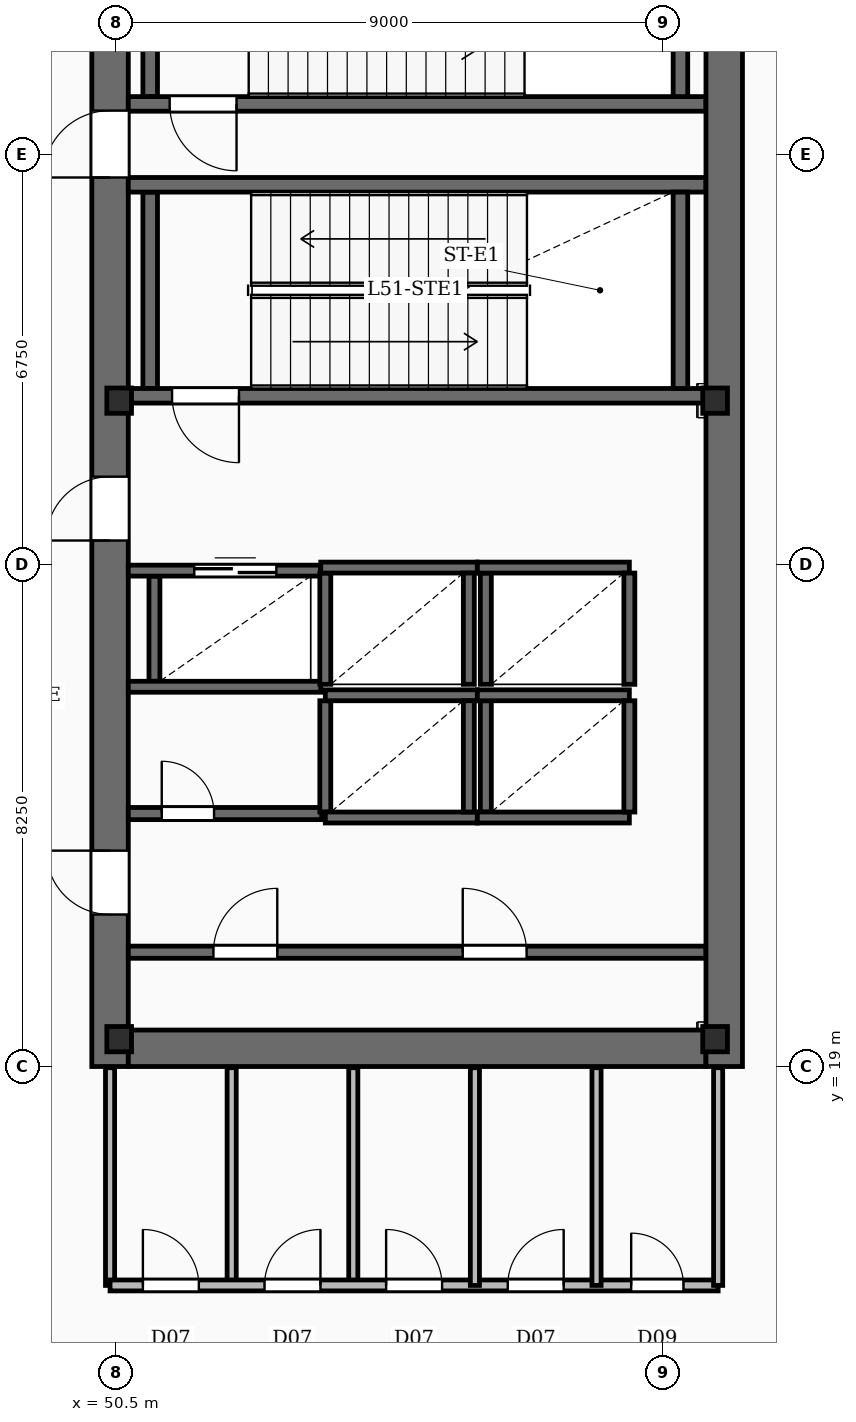
"""IFC4 building model, lengths in metres.
Left out: names, types, materials, properties, quantities, classifications, styles, units other than length and angle.
Written with IfcOpenShell. Run it as: python <this file> out.ifc"""

import sys

from ifc_helpers import new_model, si_unit, direction, frame, frame_2d, origin, origin_2d, place, context, subcontext, project, spatial, rectangle, i_section, extrude, element, fill, save


model = new_model("IFC4")
c1 = context("Model", 3, precision=1e-05, world=origin(), true_north=direction((0.0, 1.0)))
c2 = subcontext(c1, "Body", "Model", "MODEL_VIEW")
j1 = project(units=[si_unit("LENGTHUNIT", "METRE"), si_unit("PLANEANGLEUNIT", "RADIAN")], contexts=[c1])
p1 = place(None, origin())
s1 = spatial("IfcSite", under=j1, at=p1, CompositionType="ELEMENT")
p2 = place(p1, origin())
s2 = spatial("IfcBuilding", under=s1, at=p2, CompositionType="ELEMENT")
p3 = place(p2, frame((0.0, 0.0, 210.95)))
s3 = spatial("IfcBuildingStorey", under=s2, at=p3, CompositionType="ELEMENT", Elevation=210.95)
p4 = place(p3, frame((50.4, 19.0, -0.42), z_axis=(0.0, 0.0, 1.0), x_axis=(0.0, 1.0, 0.0)))
e1 = element("IfcWall", 1, at=p4, inside=s3, PredefinedType="SHEAR", context=c2, shape_type="SweptSolid", body=[
    extrude(rectangle(XDim=20.8, YDim=0.6, at=frame_2d((10.4, 0.0))), origin(), (0.0, 0.0, 1.0), 5.17),
])
p5 = place(p4, frame((2.5, 0.0, 0.42)))
e2 = element("IfcOpeningElement", 2, at=p5, cuts=e1, PredefinedType="OPENING", context=c2, shape_type="SweptSolid", body=[
    extrude(rectangle(XDim=1.05, YDim=2.15, at=frame_2d((0.525, 1.075))), frame((0.0, 0.31, 0.0), z_axis=(0.0, -1.0, 0.0), x_axis=(1.0, 0.0, 0.0)), (0.0, 0.0, 1.0), 0.62),
])
p6 = place(p4, frame((8.65, 0.0, 0.42)))
e3 = element("IfcOpeningElement", 3, at=p6, cuts=e1, PredefinedType="OPENING", context=c2, shape_type="SweptSolid", body=[
    extrude(rectangle(XDim=1.05, YDim=2.15, at=frame_2d((0.525, 1.075))), frame((0.0, 0.31, 0.0), z_axis=(0.0, -1.0, 0.0), x_axis=(1.0, 0.0, 0.0)), (0.0, 0.0, 1.0), 0.62),
])
p7 = place(p4, frame((14.62, 0.0, 0.42)))
e4 = element("IfcOpeningElement", 4, at=p7, cuts=e1, PredefinedType="OPENING", context=c2, shape_type="SweptSolid", body=[
    extrude(rectangle(XDim=1.1, YDim=2.15, at=frame_2d((0.55, 1.075))), frame((0.0, 0.31, 0.0), z_axis=(0.0, -1.0, 0.0), x_axis=(1.0, 0.0, 0.0)), (0.0, 0.0, 1.0), 0.62),
])
p8 = place(p3, frame((60.5, 19.0, -0.42), z_axis=(0.0, 0.0, 1.0), x_axis=(0.0, 1.0, 0.0)))
e5 = element("IfcWall", 5, at=p8, inside=s3, PredefinedType="SHEAR", context=c2, shape_type="SweptSolid", body=[
    extrude(rectangle(XDim=20.8, YDim=0.6, at=frame_2d((10.4, 0.0))), origin(), (0.0, 0.0, 1.0), 5.17),
])
p9 = place(p3, frame((50.7, 19.3, -0.42), z_axis=(0.0, 0.0, 1.0), x_axis=(1.0, 0.0, 0.0)))
e6 = element("IfcWall", 6, at=p9, inside=s3, PredefinedType="SHEAR", context=c2, shape_type="SweptSolid", body=[
    extrude(rectangle(XDim=9.5, YDim=0.6, at=frame_2d((4.75, 0.0))), origin(), (0.0, 0.0, 1.0), 5.17),
])
for number, where, z_axis, x_axis in (
    (7, (50.55, 19.45, -0.42), (0.0, 0.0, 1.0), (1.0, 0.0, 0.0)),
    (8, (60.35, 19.45, -0.42), (0.0, 0.0, 1.0), (1.0, 0.0, 0.0)),
    (9, (50.55, 29.95, -0.42), (0.0, 0.0, 1.0), (1.0, 0.0, 0.0)),
    (10, (60.35, 29.95, -0.42), (0.0, 0.0, 1.0), (1.0, 0.0, 0.0)),
):
    element("IfcColumn", number, at=place(p3, frame(where, z_axis=z_axis, x_axis=x_axis)), inside=s3, PredefinedType="COLUMN", context=c2, shape_type="SweptSolid", body=[
        extrude(i_section(OverallWidth=0.406, OverallDepth=0.416, WebThickness=0.03, FlangeThickness=0.048, FilletRadius=0.02, at=origin_2d()), origin(), (0.0, 0.0, 1.0), 5.17),
    ])
p10 = place(p3, frame((60.2, 30.03, 0.0), z_axis=(0.0, 0.0, 1.0), x_axis=(-1.0, 0.0, 0.0)))
e11 = element("IfcWall", 11, at=p10, inside=s3, PredefinedType="SOLIDWALL", context=c2, shape_type="SweptSolid", body=[
    extrude(rectangle(XDim=9.5, YDim=0.24, at=frame_2d((4.75, 0.0))), origin(), (0.0, 0.0, 1.0), 4.75),
])
p11 = place(p10, frame((7.68, 0.0, 0.0)))
e12 = element("IfcOpeningElement", 12, at=p11, cuts=e11, PredefinedType="OPENING", context=c2, shape_type="SweptSolid", body=[
    extrude(rectangle(XDim=1.1, YDim=2.15, at=frame_2d((0.55, 1.075))), frame((0.0, 0.13, 0.0), z_axis=(0.0, -1.0, 0.0), x_axis=(1.0, 0.0, 0.0)), (0.0, 0.0, 1.0), 0.26),
])
p12 = place(p3, frame((50.7, 33.5, 0.0), z_axis=(0.0, 0.0, 1.0), x_axis=(1.0, 0.0, 0.0)))
e13 = element("IfcWall", 13, at=p12, inside=s3, PredefinedType="SOLIDWALL", context=c2, shape_type="SweptSolid", body=[
    extrude(rectangle(XDim=9.5, YDim=0.24, at=frame_2d((4.75, 0.0))), origin(), (0.0, 0.0, 1.0), 4.75),
])
for number, where, z_axis, x_axis in (
    (14, (51.06, 30.15, 0.0), (0.0, 0.0, 1.0), (0.0, 1.0, 0.0)),
    (15, (59.78, 30.15, 0.0), (0.0, 0.0, 1.0), (0.0, 1.0, 0.0)),
):
    element("IfcWall", number, at=place(p3, frame(where, z_axis=z_axis, x_axis=x_axis)), inside=s3, PredefinedType="SOLIDWALL", context=c2, shape_type="SweptSolid", body=[
        extrude(rectangle(XDim=3.23, YDim=0.24, at=frame_2d((1.615, 0.0))), origin(), (0.0, 0.0, 1.0), 4.75),
    ])
p13 = place(p3, frame((60.2, 34.83, 0.0), z_axis=(0.0, 0.0, 1.0), x_axis=(-1.0, 0.0, 0.0)))
e16 = element("IfcWall", 16, at=p13, inside=s3, PredefinedType="SOLIDWALL", context=c2, shape_type="SweptSolid", body=[
    extrude(rectangle(XDim=9.5, YDim=0.24, at=frame_2d((4.75, 0.0))), origin(), (0.0, 0.0, 1.0), 4.75),
])
p14 = place(p13, frame((7.72, 0.0, 0.0)))
e17 = element("IfcOpeningElement", 17, at=p14, cuts=e16, PredefinedType="OPENING", context=c2, shape_type="SweptSolid", body=[
    extrude(rectangle(XDim=1.1, YDim=2.15, at=frame_2d((0.55, 1.075))), frame((0.0, 0.13, 0.0), z_axis=(0.0, -1.0, 0.0), x_axis=(1.0, 0.0, 0.0)), (0.0, 0.0, 1.0), 0.26),
])
for number, where, z_axis, x_axis in (
    (18, (51.06, 34.95, 0.0), (0.0, 0.0, 1.0), (0.0, 1.0, 0.0)),
    (19, (59.78, 34.95, 0.0), (0.0, 0.0, 1.0), (0.0, 1.0, 0.0)),
):
    element("IfcWall", number, at=place(p3, frame(where, z_axis=z_axis, x_axis=x_axis)), inside=s3, PredefinedType="SOLIDWALL", context=c2, shape_type="SweptSolid", body=[
        extrude(rectangle(XDim=3.15, YDim=0.24, at=frame_2d((1.575, 0.0))), origin(), (0.0, 0.0, 1.0), 4.75),
    ])
for number, where, z_axis, x_axis in (
    (20, (53.94, 25.105, 0.0), (0.0, 0.0, 1.0), (1.0, 0.0, 0.0)),
    (21, (53.94, 23.095, 0.0), (0.0, 0.0, 1.0), (1.0, 0.0, 0.0)),
):
    element("IfcWall", number, at=place(p3, frame(where, z_axis=z_axis, x_axis=x_axis)), inside=s3, PredefinedType="SOLIDWALL", context=c2, shape_type="SweptSolid", body=[
        extrude(rectangle(XDim=2.5, YDim=0.18, at=frame_2d((1.25, 0.0))), origin(), (0.0, 0.0, 1.0), 4.75),
    ])
for number, where, z_axis, x_axis in (
    (22, (53.94, 23.185, 0.0), (0.0, 0.0, 1.0), (0.0, 1.0, 0.0)),
    (23, (56.3, 23.185, 0.0), (0.0, 0.0, 1.0), (0.0, 1.0, 0.0)),
):
    element("IfcWall", number, at=place(p3, frame(where, z_axis=z_axis, x_axis=x_axis)), inside=s3, PredefinedType="SOLIDWALL", context=c2, shape_type="SweptSolid", body=[
        extrude(rectangle(XDim=1.83, YDim=0.18, at=frame_2d((0.915, 0.0))), origin(), (0.0, 0.0, 1.0), 4.75),
    ])
for number, where, z_axis, x_axis in (
    (24, (56.44, 25.105, 0.0), (0.0, 0.0, 1.0), (1.0, 0.0, 0.0)),
    (25, (56.44, 23.095, 0.0), (0.0, 0.0, 1.0), (1.0, 0.0, 0.0)),
):
    element("IfcWall", number, at=place(p3, frame(where, z_axis=z_axis, x_axis=x_axis)), inside=s3, PredefinedType="SOLIDWALL", context=c2, shape_type="SweptSolid", body=[
        extrude(rectangle(XDim=2.5, YDim=0.18, at=frame_2d((1.25, 0.0))), origin(), (0.0, 0.0, 1.0), 4.75),
    ])
for number, where, z_axis, x_axis in (
    (26, (56.58, 23.185, 0.0), (0.0, 0.0, 1.0), (0.0, 1.0, 0.0)),
    (27, (58.94, 23.185, 0.0), (0.0, 0.0, 1.0), (0.0, 1.0, 0.0)),
):
    element("IfcWall", number, at=place(p3, frame(where, z_axis=z_axis, x_axis=x_axis)), inside=s3, PredefinedType="SOLIDWALL", context=c2, shape_type="SweptSolid", body=[
        extrude(rectangle(XDim=1.83, YDim=0.18, at=frame_2d((0.915, 0.0))), origin(), (0.0, 0.0, 1.0), 4.75),
    ])
p15 = place(p3, frame((53.865, 27.205, 0.0), z_axis=(0.0, 0.0, 1.0), x_axis=(1.0, 0.0, 0.0)))
e28 = element("IfcWall", 28, at=p15, inside=s3, PredefinedType="SOLIDWALL", context=c2, shape_type="SweptSolid", body=[
    extrude(rectangle(XDim=2.575, YDim=0.18, at=frame_2d((1.288, 0.0))), origin(), (0.0, 0.0, 1.0), 4.75),
])
for number, where, z_axis, x_axis in (
    (29, (53.94, 25.285, 0.0), (0.0, 0.0, 1.0), (0.0, 1.0, 0.0)),
    (30, (56.3, 25.285, 0.0), (0.0, 0.0, 1.0), (0.0, 1.0, 0.0)),
):
    element("IfcWall", number, at=place(p3, frame(where, z_axis=z_axis, x_axis=x_axis)), inside=s3, PredefinedType="SOLIDWALL", context=c2, shape_type="SweptSolid", body=[
        extrude(rectangle(XDim=1.83, YDim=0.18, at=frame_2d((0.915, 0.0))), origin(), (0.0, 0.0, 1.0), 4.75),
    ])
p16 = place(p3, frame((56.44, 27.205, 0.0), z_axis=(0.0, 0.0, 1.0), x_axis=(1.0, 0.0, 0.0)))
e31 = element("IfcWall", 31, at=p16, inside=s3, PredefinedType="SOLIDWALL", context=c2, shape_type="SweptSolid", body=[
    extrude(rectangle(XDim=2.5, YDim=0.18, at=frame_2d((1.25, 0.0))), origin(), (0.0, 0.0, 1.0), 4.75),
])
for number, where, z_axis, x_axis in (
    (32, (56.58, 25.285, 0.0), (0.0, 0.0, 1.0), (0.0, 1.0, 0.0)),
    (33, (58.94, 25.285, 0.0), (0.0, 0.0, 1.0), (0.0, 1.0, 0.0)),
):
    element("IfcWall", number, at=place(p3, frame(where, z_axis=z_axis, x_axis=x_axis)), inside=s3, PredefinedType="SOLIDWALL", context=c2, shape_type="SweptSolid", body=[
        extrude(rectangle(XDim=1.83, YDim=0.18, at=frame_2d((0.915, 0.0))), origin(), (0.0, 0.0, 1.0), 4.75),
    ])
p17 = place(p3, frame((50.7, 27.155, 0.0), z_axis=(0.0, 0.0, 1.0), x_axis=(1.0, 0.0, 0.0)))
e34 = element("IfcWall", 34, at=p17, inside=s3, PredefinedType="SOLIDWALL", context=c2, shape_type="SweptSolid", body=[
    extrude(rectangle(XDim=3.165, YDim=0.18, at=frame_2d((1.583, 0.0))), origin(), (0.0, 0.0, 1.0), 4.75),
])
p18 = place(p17, frame((1.085, 0.0, 0.0)))
e35 = element("IfcOpeningElement", 35, at=p18, cuts=e34, PredefinedType="OPENING", context=c2, shape_type="SweptSolid", body=[
    extrude(rectangle(XDim=1.35, YDim=2.3, at=frame_2d((0.675, 1.15))), frame((0.0, 0.1, 0.0), z_axis=(0.0, -1.0, 0.0), x_axis=(1.0, 0.0, 0.0)), (0.0, 0.0, 1.0), 0.2),
])
p19 = place(p3, frame((50.7, 25.245, 0.0), z_axis=(0.0, 0.0, 1.0), x_axis=(1.0, 0.0, 0.0)))
e36 = element("IfcWall", 36, at=p19, inside=s3, PredefinedType="SOLIDWALL", context=c2, shape_type="SweptSolid", body=[
    extrude(rectangle(XDim=3.165, YDim=0.18, at=frame_2d((1.583, 0.0))), origin(), (0.0, 0.0, 1.0), 4.75),
])
p20 = place(p3, frame((51.13, 25.335, 0.0), z_axis=(0.0, 0.0, 1.0), x_axis=(0.0, 1.0, 0.0)))
e37 = element("IfcWall", 37, at=p20, inside=s3, PredefinedType="SOLIDWALL", context=c2, shape_type="SweptSolid", body=[
    extrude(rectangle(XDim=1.73, YDim=0.18, at=frame_2d((0.865, 0.0))), origin(), (0.0, 0.0, 1.0), 4.75),
])
p21 = place(p3, frame((50.7, 20.88, 0.0), z_axis=(0.0, 0.0, 1.0), x_axis=(1.0, 0.0, 0.0)))
e38 = element("IfcWall", 38, at=p21, inside=s3, PredefinedType="SOLIDWALL", context=c2, shape_type="SweptSolid", body=[
    extrude(rectangle(XDim=9.5, YDim=0.2, at=frame_2d((4.75, 0.0))), origin(), (0.0, 0.0, 1.0), 3.81),
])
p22 = place(p21, frame((1.4, 0.0, 0.0)))
e39 = element("IfcOpeningElement", 39, at=p22, cuts=e38, PredefinedType="OPENING", context=c2, shape_type="SweptSolid", body=[
    extrude(rectangle(XDim=1.05, YDim=2.15, at=frame_2d((0.525, 1.075))), frame((0.0, 0.11, 0.0), z_axis=(0.0, -1.0, 0.0), x_axis=(1.0, 0.0, 0.0)), (0.0, 0.0, 1.0), 0.22),
])
p23 = place(p21, frame((5.5, 0.0, 0.0)))
e40 = element("IfcOpeningElement", 40, at=p23, cuts=e38, PredefinedType="OPENING", context=c2, shape_type="SweptSolid", body=[
    extrude(rectangle(XDim=1.05, YDim=2.15, at=frame_2d((0.525, 1.075))), frame((0.0, 0.11, 0.0), z_axis=(0.0, -1.0, 0.0), x_axis=(1.0, 0.0, 0.0)), (0.0, 0.0, 1.0), 0.22),
])
p24 = place(p3, frame((50.7, 23.16, 0.0), z_axis=(0.0, 0.0, 1.0), x_axis=(1.0, 0.0, 0.0)))
e41 = element("IfcWall", 41, at=p24, inside=s3, PredefinedType="SOLIDWALL", context=c2, shape_type="SweptSolid", body=[
    extrude(rectangle(XDim=3.18, YDim=0.2, at=frame_2d((1.59, 0.0))), origin(), (0.0, 0.0, 1.0), 3.81),
])
p25 = place(p24, frame((0.55, 0.0, 0.0)))
e42 = element("IfcOpeningElement", 42, at=p25, cuts=e41, PredefinedType="OPENING", context=c2, shape_type="SweptSolid", body=[
    extrude(rectangle(XDim=0.86, YDim=2.05, at=frame_2d((0.43, 1.025))), frame((0.0, 0.11, 0.0), z_axis=(0.0, -1.0, 0.0), x_axis=(1.0, 0.0, 0.0)), (0.0, 0.0, 1.0), 0.22),
])
for number, where, z_axis, x_axis in (
    (43, (52.4, 15.4, 0.0), (0.0, 0.0, 1.0), (0.0, 1.0, 0.0)),
    (44, (54.4, 15.4, 0.0), (0.0, 0.0, 1.0), (0.0, 1.0, 0.0)),
    (45, (56.4, 15.4, 0.0), (0.0, 0.0, 1.0), (0.0, 1.0, 0.0)),
    (46, (58.4, 15.4, 0.0), (0.0, 0.0, 1.0), (0.0, 1.0, 0.0)),
):
    element("IfcWall", number, at=place(p3, frame(where, z_axis=z_axis, x_axis=x_axis)), inside=s3, PredefinedType="PARTITIONING", context=c2, shape_type="SweptSolid", body=[
        extrude(rectangle(XDim=3.58, YDim=0.15, at=frame_2d((1.79, 0.0))), origin(), (0.0, 0.0, 1.0), 3.81),
    ])
p26 = place(p3, frame((50.4, 15.4, 0.0), z_axis=(0.0, 0.0, 1.0), x_axis=(1.0, 0.0, 0.0)))
e47 = element("IfcWall", 47, at=p26, inside=s3, PredefinedType="SOLIDWALL", context=c2, shape_type="SweptSolid", body=[
    extrude(rectangle(XDim=10.0, YDim=0.18, at=frame_2d((5.0, 0.0))), origin(), (0.0, 0.0, 1.0), 3.81),
])
p27 = place(p26, frame((0.54, 0.0, 0.0)))
e48 = element("IfcOpeningElement", 48, at=p27, cuts=e47, PredefinedType="OPENING", context=c2, shape_type="SweptSolid", body=[
    extrude(rectangle(XDim=0.92, YDim=2.1, at=frame_2d((0.46, 1.05))), frame((0.0, 0.1, 0.0), z_axis=(0.0, -1.0, 0.0), x_axis=(1.0, 0.0, 0.0)), (0.0, 0.0, 1.0), 0.2),
])
p28 = place(p26, frame((2.54, 0.0, 0.0)))
e49 = element("IfcOpeningElement", 49, at=p28, cuts=e47, PredefinedType="OPENING", context=c2, shape_type="SweptSolid", body=[
    extrude(rectangle(XDim=0.92, YDim=2.1, at=frame_2d((0.46, 1.05))), frame((0.0, 0.1, 0.0), z_axis=(0.0, -1.0, 0.0), x_axis=(1.0, 0.0, 0.0)), (0.0, 0.0, 1.0), 0.2),
])
p29 = place(p26, frame((4.54, 0.0, 0.0)))
e50 = element("IfcOpeningElement", 50, at=p29, cuts=e47, PredefinedType="OPENING", context=c2, shape_type="SweptSolid", body=[
    extrude(rectangle(XDim=0.92, YDim=2.1, at=frame_2d((0.46, 1.05))), frame((0.0, 0.1, 0.0), z_axis=(0.0, -1.0, 0.0), x_axis=(1.0, 0.0, 0.0)), (0.0, 0.0, 1.0), 0.2),
])
p30 = place(p26, frame((6.54, 0.0, 0.0)))
e51 = element("IfcOpeningElement", 51, at=p30, cuts=e47, PredefinedType="OPENING", context=c2, shape_type="SweptSolid", body=[
    extrude(rectangle(XDim=0.92, YDim=2.1, at=frame_2d((0.46, 1.05))), frame((0.0, 0.1, 0.0), z_axis=(0.0, -1.0, 0.0), x_axis=(1.0, 0.0, 0.0)), (0.0, 0.0, 1.0), 0.2),
])
p31 = place(p26, frame((8.57, 0.0, 0.0)))
e52 = element("IfcOpeningElement", 52, at=p31, cuts=e47, PredefinedType="OPENING", context=c2, shape_type="SweptSolid", body=[
    extrude(rectangle(XDim=0.86, YDim=2.05, at=frame_2d((0.43, 1.025))), frame((0.0, 0.1, 0.0), z_axis=(0.0, -1.0, 0.0), x_axis=(1.0, 0.0, 0.0)), (0.0, 0.0, 1.0), 0.2),
])
for number, where, z_axis, x_axis in (
    (53, (50.4, 15.4, 0.0), (0.0, 0.0, 1.0), (0.0, 1.0, 0.0)),
    (54, (60.4, 15.4, 0.0), (0.0, 0.0, 1.0), (0.0, 1.0, 0.0)),
):
    element("IfcWall", number, at=place(p3, frame(where, z_axis=z_axis, x_axis=x_axis)), inside=s3, PredefinedType="PARTITIONING", context=c2, shape_type="SweptSolid", body=[
        extrude(rectangle(XDim=3.58, YDim=0.15, at=frame_2d((1.79, 0.0))), origin(), (0.0, 0.0, 1.0), 2.8),
    ])
p32 = place(p5, origin())
e55 = element("IfcDoor", 55, at=p32, inside=s3, OperationType="SINGLE_SWING_RIGHT", PredefinedType="DOOR", context=c2, shape_type="SweptSolid", body=[
    extrude(rectangle(XDim=1.05, YDim=2.15, at=frame_2d((0.525, 1.075))), frame((0.0, 0.025, 0.0), z_axis=(0.0, -1.0, 0.0), x_axis=(1.0, 0.0, 0.0)), (0.0, 0.0, 1.0), 0.05),
])
fill(e2, e55)
p33 = place(p6, origin())
e56 = element("IfcDoor", 56, at=p33, inside=s3, OperationType="SINGLE_SWING_LEFT", PredefinedType="DOOR", context=c2, shape_type="SweptSolid", body=[
    extrude(rectangle(XDim=1.05, YDim=2.15, at=frame_2d((0.525, 1.075))), frame((0.0, 0.025, 0.0), z_axis=(0.0, -1.0, 0.0), x_axis=(1.0, 0.0, 0.0)), (0.0, 0.0, 1.0), 0.05),
])
fill(e3, e56)
p34 = place(p7, origin())
e57 = element("IfcDoor", 57, at=p34, inside=s3, OperationType="SINGLE_SWING_LEFT", PredefinedType="DOOR", context=c2, shape_type="SweptSolid", body=[
    extrude(rectangle(XDim=1.1, YDim=2.15, at=frame_2d((0.55, 1.075))), frame((0.0, 0.025, 0.0), z_axis=(0.0, -1.0, 0.0), x_axis=(1.0, 0.0, 0.0)), (0.0, 0.0, 1.0), 0.05),
])
fill(e4, e57)
p35 = place(p11, origin())
e58 = element("IfcDoor", 58, at=p35, inside=s3, OperationType="SINGLE_SWING_LEFT", PredefinedType="DOOR", context=c2, shape_type="SweptSolid", body=[
    extrude(rectangle(XDim=1.1, YDim=2.15, at=frame_2d((0.55, 1.075))), frame((0.0, 0.025, 0.0), z_axis=(0.0, -1.0, 0.0), x_axis=(1.0, 0.0, 0.0)), (0.0, 0.0, 1.0), 0.05),
])
fill(e12, e58)
p36 = place(p14, origin())
e59 = element("IfcDoor", 59, at=p36, inside=s3, OperationType="SINGLE_SWING_LEFT", PredefinedType="DOOR", context=c2, shape_type="SweptSolid", body=[
    extrude(rectangle(XDim=1.1, YDim=2.15, at=frame_2d((0.55, 1.075))), frame((0.0, 0.025, 0.0), z_axis=(0.0, -1.0, 0.0), x_axis=(1.0, 0.0, 0.0)), (0.0, 0.0, 1.0), 0.05),
])
fill(e17, e59)
p37 = place(p18, origin())
e60 = element("IfcDoor", 60, at=p37, inside=s3, OperationType="DOUBLE_DOOR_SLIDING", PredefinedType="DOOR", context=c2, shape_type="SweptSolid", body=[
    extrude(rectangle(XDim=1.35, YDim=2.3, at=frame_2d((0.675, 1.15))), frame((0.0, 0.025, 0.0), z_axis=(0.0, -1.0, 0.0), x_axis=(1.0, 0.0, 0.0)), (0.0, 0.0, 1.0), 0.05),
])
fill(e35, e60)
p38 = place(p22, origin())
e61 = element("IfcDoor", 61, at=p38, inside=s3, OperationType="SINGLE_SWING_RIGHT", PredefinedType="DOOR", context=c2, shape_type="SweptSolid", body=[
    extrude(rectangle(XDim=1.05, YDim=2.15, at=frame_2d((0.525, 1.075))), frame((0.0, 0.025, 0.0), z_axis=(0.0, -1.0, 0.0), x_axis=(1.0, 0.0, 0.0)), (0.0, 0.0, 1.0), 0.05),
])
fill(e39, e61)
p39 = place(p23, origin())
e62 = element("IfcDoor", 62, at=p39, inside=s3, OperationType="SINGLE_SWING_LEFT", PredefinedType="DOOR", context=c2, shape_type="SweptSolid", body=[
    extrude(rectangle(XDim=1.05, YDim=2.15, at=frame_2d((0.525, 1.075))), frame((0.0, 0.025, 0.0), z_axis=(0.0, -1.0, 0.0), x_axis=(1.0, 0.0, 0.0)), (0.0, 0.0, 1.0), 0.05),
])
fill(e40, e62)
p40 = place(p25, origin())
e63 = element("IfcDoor", 63, at=p40, inside=s3, OperationType="SINGLE_SWING_LEFT", PredefinedType="DOOR", context=c2, shape_type="SweptSolid", body=[
    extrude(rectangle(XDim=0.86, YDim=2.05, at=frame_2d((0.43, 1.025))), frame((0.0, 0.025, 0.0), z_axis=(0.0, -1.0, 0.0), x_axis=(1.0, 0.0, 0.0)), (0.0, 0.0, 1.0), 0.05),
])
fill(e42, e63)
p41 = place(p27, origin())
e64 = element("IfcDoor", 64, at=p41, inside=s3, OperationType="SINGLE_SWING_LEFT", PredefinedType="DOOR", context=c2, shape_type="SweptSolid", body=[
    extrude(rectangle(XDim=0.92, YDim=2.1, at=frame_2d((0.46, 1.05))), frame((0.0, 0.025, 0.0), z_axis=(0.0, -1.0, 0.0), x_axis=(1.0, 0.0, 0.0)), (0.0, 0.0, 1.0), 0.05),
])
fill(e48, e64)
p42 = place(p28, origin())
e65 = element("IfcDoor", 65, at=p42, inside=s3, OperationType="SINGLE_SWING_RIGHT", PredefinedType="DOOR", context=c2, shape_type="SweptSolid", body=[
    extrude(rectangle(XDim=0.92, YDim=2.1, at=frame_2d((0.46, 1.05))), frame((0.0, 0.025, 0.0), z_axis=(0.0, -1.0, 0.0), x_axis=(1.0, 0.0, 0.0)), (0.0, 0.0, 1.0), 0.05),
])
fill(e49, e65)
p43 = place(p29, origin())
e66 = element("IfcDoor", 66, at=p43, inside=s3, OperationType="SINGLE_SWING_LEFT", PredefinedType="DOOR", context=c2, shape_type="SweptSolid", body=[
    extrude(rectangle(XDim=0.92, YDim=2.1, at=frame_2d((0.46, 1.05))), frame((0.0, 0.025, 0.0), z_axis=(0.0, -1.0, 0.0), x_axis=(1.0, 0.0, 0.0)), (0.0, 0.0, 1.0), 0.05),
])
fill(e50, e66)
p44 = place(p30, origin())
e67 = element("IfcDoor", 67, at=p44, inside=s3, OperationType="SINGLE_SWING_RIGHT", PredefinedType="DOOR", context=c2, shape_type="SweptSolid", body=[
    extrude(rectangle(XDim=0.92, YDim=2.1, at=frame_2d((0.46, 1.05))), frame((0.0, 0.025, 0.0), z_axis=(0.0, -1.0, 0.0), x_axis=(1.0, 0.0, 0.0)), (0.0, 0.0, 1.0), 0.05),
])
fill(e51, e67)
p45 = place(p31, origin())
e68 = element("IfcDoor", 68, at=p45, inside=s3, OperationType="SINGLE_SWING_LEFT", PredefinedType="DOOR", context=c2, shape_type="SweptSolid", body=[
    extrude(rectangle(XDim=0.86, YDim=2.05, at=frame_2d((0.43, 1.025))), frame((0.0, 0.025, 0.0), z_axis=(0.0, -1.0, 0.0), x_axis=(1.0, 0.0, 0.0)), (0.0, 0.0, 1.0), 0.05),
])
fill(e52, e68)
save(model, sys.argv[1])
